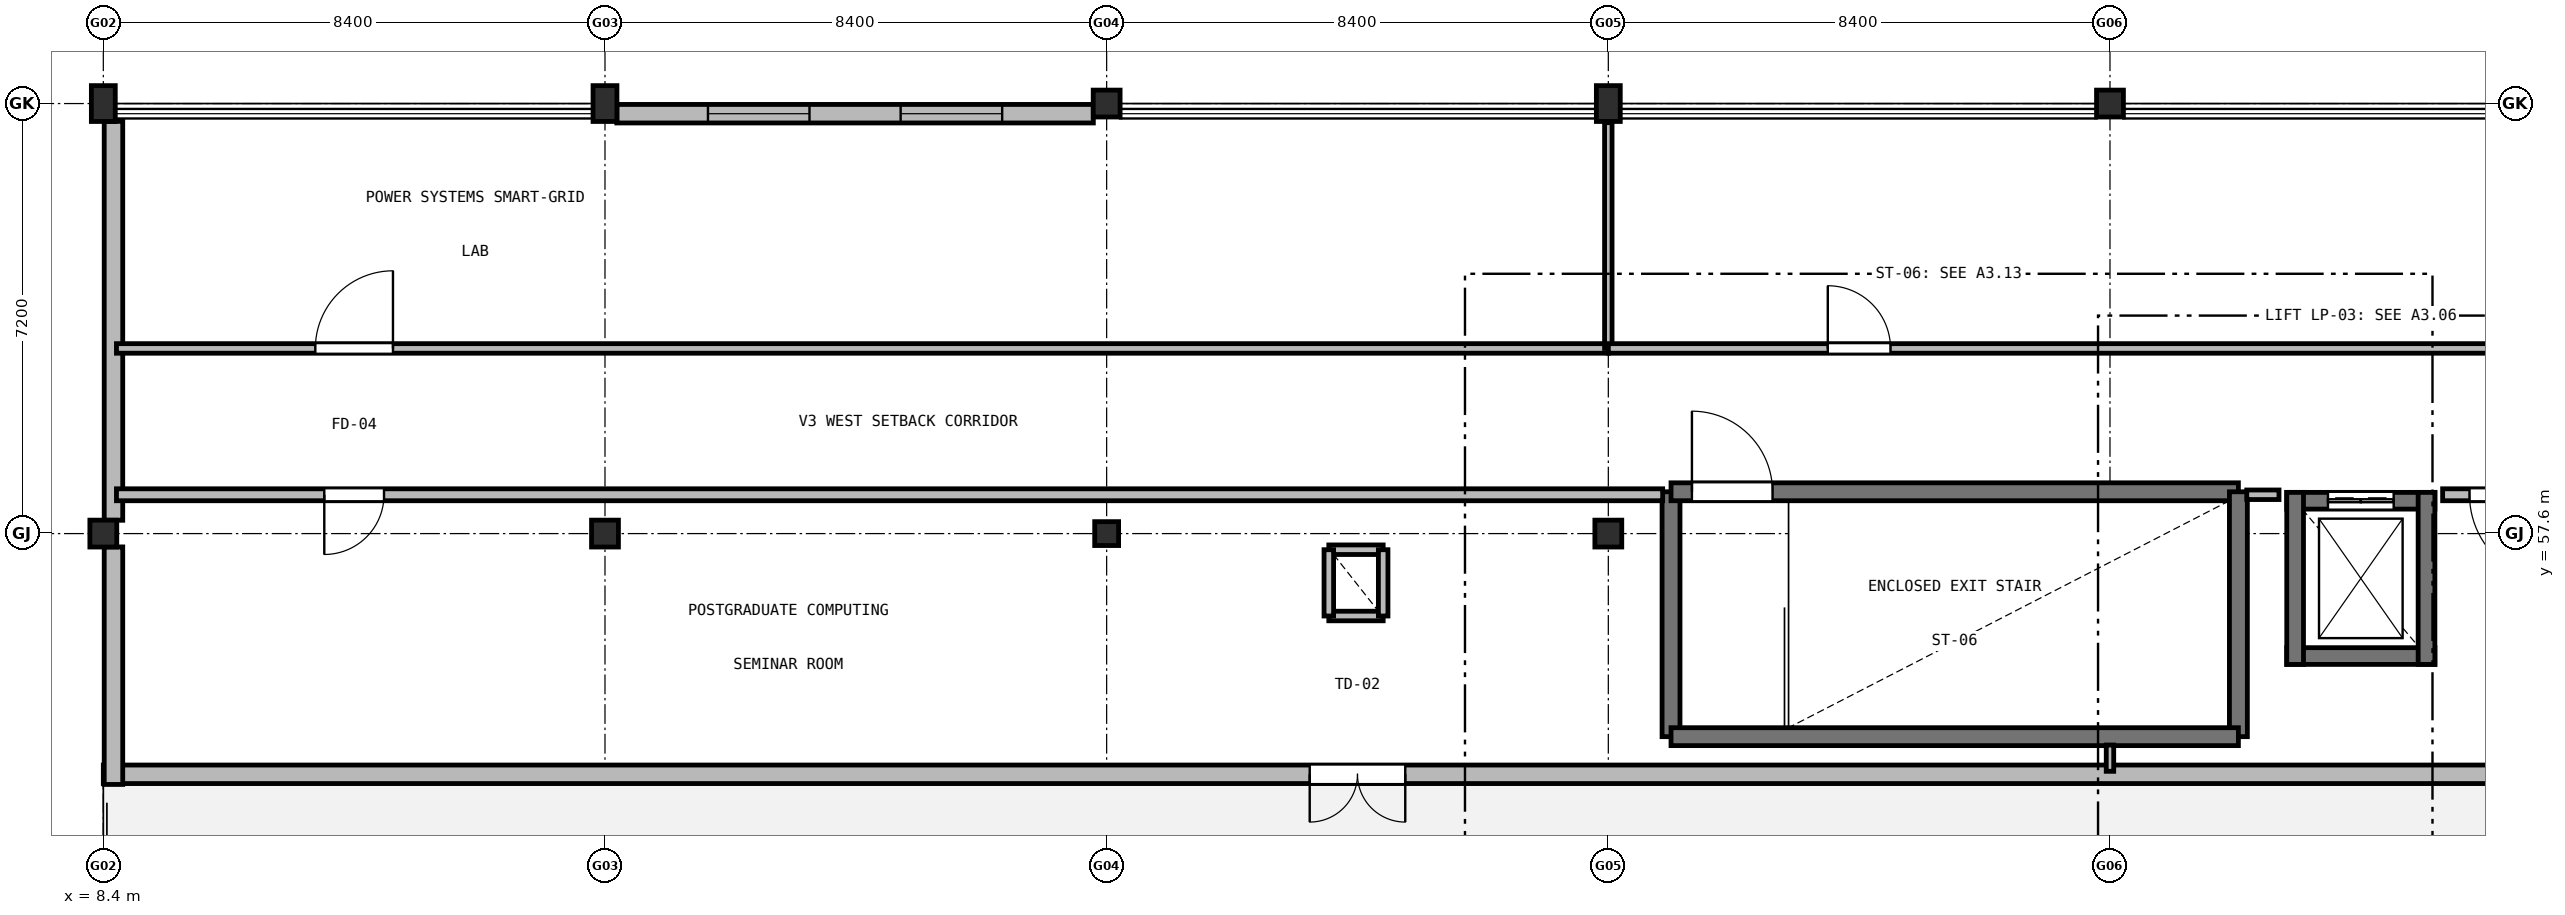
"""IFC4 building model, lengths in metres.
Left out: names, types, materials, properties, quantities, classifications, styles, units other than length and angle.
Written with IfcOpenShell. Run it as: python <this file> out.ifc"""

import sys

from ifc_helpers import new_model, si_unit, direction, frame, frame_2d, origin, origin_2d, place, context, subcontext, project, spatial, rectangle, extrude, element, fill, save


model = new_model("IFC4")
c1 = context("Model", 3, precision=1e-05, world=origin(), true_north=direction((0.0, 1.0)))
c2 = subcontext(c1, "Body", "Model", "MODEL_VIEW")
j1 = project(units=[si_unit("LENGTHUNIT", "METRE"), si_unit("PLANEANGLEUNIT", "RADIAN")], contexts=[c1])
p1 = place(None, origin())
s1 = spatial("IfcSite", under=j1, at=p1, CompositionType="ELEMENT")
p2 = place(p1, origin())
s2 = spatial("IfcBuilding", under=s1, at=p2, CompositionType="ELEMENT")
p3 = place(p2, frame((0.0, 0.0, 13.5)))
s3 = spatial("IfcBuildingStorey", under=s2, at=p3, CompositionType="ELEMENT", Elevation=13.5)
p4 = place(p3, frame((8.4, 57.6, 0.0), z_axis=(0.0, 0.0, 1.0), x_axis=(1.0, 0.0, 0.0)))
e1 = element("IfcColumn", 1, at=p4, inside=s3, PredefinedType="COLUMN", context=c2, shape_type="SweptSolid", body=[
    extrude(rectangle(XDim=0.45, YDim=0.45, at=origin_2d()), origin(), (0.0, 0.0, 1.0), 4.2),
])
p5 = place(p3, frame((8.4, 64.8, 0.0), z_axis=(0.0, 0.0, 1.0), x_axis=(1.0, 0.0, 0.0)))
e2 = element("IfcColumn", 2, at=p5, inside=s3, PredefinedType="COLUMN", context=c2, shape_type="SweptSolid", body=[
    extrude(rectangle(XDim=0.4, YDim=0.6, at=origin_2d()), origin(), (0.0, 0.0, 1.0), 4.2),
])
p6 = place(p3, frame((16.8, 57.6, 0.0), z_axis=(0.0, 0.0, 1.0), x_axis=(1.0, 0.0, 0.0)))
e3 = element("IfcColumn", 3, at=p6, inside=s3, PredefinedType="COLUMN", context=c2, shape_type="SweptSolid", body=[
    extrude(rectangle(XDim=0.45, YDim=0.45, at=origin_2d()), origin(), (0.0, 0.0, 1.0), 4.2),
])
p7 = place(p3, frame((16.8, 64.8, 0.0), z_axis=(0.0, 0.0, 1.0), x_axis=(1.0, 0.0, 0.0)))
e4 = element("IfcColumn", 4, at=p7, inside=s3, PredefinedType="COLUMN", context=c2, shape_type="SweptSolid", body=[
    extrude(rectangle(XDim=0.4, YDim=0.6, at=origin_2d()), origin(), (0.0, 0.0, 1.0), 4.2),
])
p8 = place(p3, frame((25.2, 57.6, 0.0), z_axis=(0.0, 0.0, 1.0), x_axis=(1.0, 0.0, 0.0)))
e5 = element("IfcColumn", 5, at=p8, inside=s3, PredefinedType="COLUMN", context=c2, shape_type="SweptSolid", body=[
    extrude(rectangle(XDim=0.4, YDim=0.4, at=origin_2d()), origin(), (0.0, 0.0, 1.0), 4.2),
])
for number, where, z_axis, x_axis in (
    (6, (25.2, 64.8, 0.0), (0.0, 0.0, 1.0), (1.0, 0.0, 0.0)),
    (7, (33.6, 57.6, 0.0), (0.0, 0.0, 1.0), (1.0, 0.0, 0.0)),
):
    element("IfcColumn", number, at=place(p3, frame(where, z_axis=z_axis, x_axis=x_axis)), inside=s3, PredefinedType="COLUMN", context=c2, shape_type="SweptSolid", body=[
        extrude(rectangle(XDim=0.45, YDim=0.45, at=origin_2d()), origin(), (0.0, 0.0, 1.0), 4.2),
    ])
p9 = place(p3, frame((33.6, 64.8, 0.0), z_axis=(0.0, 0.0, 1.0), x_axis=(1.0, 0.0, 0.0)))
e8 = element("IfcColumn", 8, at=p9, inside=s3, PredefinedType="COLUMN", context=c2, shape_type="SweptSolid", body=[
    extrude(rectangle(XDim=0.4, YDim=0.6, at=origin_2d()), origin(), (0.0, 0.0, 1.0), 4.2),
])
p10 = place(p3, frame((42.0, 64.8, 0.0), z_axis=(0.0, 0.0, 1.0), x_axis=(1.0, 0.0, 0.0)))
e9 = element("IfcColumn", 9, at=p10, inside=s3, PredefinedType="COLUMN", context=c2, shape_type="SweptSolid", body=[
    extrude(rectangle(XDim=0.45, YDim=0.45, at=origin_2d()), origin(), (0.0, 0.0, 1.0), 4.2),
])
p11 = place(p3, frame((16.998, 64.63, 0.0), z_axis=(0.0, 0.0, 1.0), x_axis=(1.0, 0.0, 0.0)))
e10 = element("IfcWall", 10, at=p11, inside=s3, PredefinedType="SOLIDWALL", context=c2, shape_type="SweptSolid", body=[
    extrude(rectangle(XDim=7.979, YDim=0.31, at=frame_2d((3.99, 0.0))), origin(), (0.0, 0.0, 1.0), 3.16),
])
p12 = place(p11, frame((1.526, 0.0, 0.95)))
e11 = element("IfcOpeningElement", 11, at=p12, cuts=e10, PredefinedType="OPENING", context=c2, shape_type="SweptSolid", body=[
    extrude(rectangle(XDim=1.7, YDim=1.65, at=frame_2d((0.85, 0.825))), frame((0.0, 0.165, 0.0), z_axis=(0.0, -1.0, 0.0), x_axis=(1.0, 0.0, 0.0)), (0.0, 0.0, 1.0), 0.33),
])
p13 = place(p11, frame((4.753, 0.0, 0.95)))
e12 = element("IfcOpeningElement", 12, at=p13, cuts=e10, PredefinedType="OPENING", context=c2, shape_type="SweptSolid", body=[
    extrude(rectangle(XDim=1.7, YDim=1.65, at=frame_2d((0.85, 0.825))), frame((0.0, 0.165, 0.0), z_axis=(0.0, -1.0, 0.0), x_axis=(1.0, 0.0, 0.0)), (0.0, 0.0, 1.0), 0.33),
])
p14 = place(p3, frame((67.2, 53.57, 0.0), z_axis=(0.0, 0.0, 1.0), x_axis=(-1.0, 0.0, 0.0)))
e13 = element("IfcWall", 13, at=p14, inside=s3, PredefinedType="SOLIDWALL", context=c2, shape_type="SweptSolid", body=[
    extrude(rectangle(XDim=58.8, YDim=0.31, at=frame_2d((29.4, 0.0))), origin(), (0.0, 0.0, 1.0), 3.86),
])
p15 = place(p14, frame((37.0, 0.0, 0.0)))
e14 = element("IfcOpeningElement", 14, at=p15, cuts=e13, PredefinedType="OPENING", context=c2, shape_type="SweptSolid", body=[
    extrude(rectangle(XDim=1.6, YDim=2.2, at=frame_2d((0.8, 1.1))), frame((0.0, 0.165, 0.0), z_axis=(0.0, -1.0, 0.0), x_axis=(1.0, 0.0, 0.0)), (0.0, 0.0, 1.0), 0.33),
])
p16 = place(p3, frame((8.57, 53.4, 0.0), z_axis=(0.0, 0.0, 1.0), x_axis=(0.0, 1.0, 0.0)))
e15 = element("IfcWall", 15, at=p16, inside=s3, PredefinedType="SOLIDWALL", context=c2, shape_type="SweptSolid", body=[
    extrude(rectangle(XDim=3.977, YDim=0.31, at=frame_2d((1.989, 0.0))), origin(), (0.0, 0.0, 1.0), 3.86),
])
p17 = place(p3, frame((8.57, 57.823, 0.0), z_axis=(0.0, 0.0, 1.0), x_axis=(0.0, 1.0, 0.0)))
e16 = element("IfcWall", 16, at=p17, inside=s3, PredefinedType="SOLIDWALL", context=c2, shape_type="SweptSolid", body=[
    extrude(rectangle(XDim=6.679, YDim=0.31, at=frame_2d((3.339, 0.0))), origin(), (0.0, 0.0, 1.0), 3.36),
])
p18 = place(p3, frame((34.65, 54.2, 0.0), z_axis=(0.0, 0.0, 1.0), x_axis=(0.0, 1.0, 0.0)))
e17 = element("IfcWall", 17, at=p18, inside=s3, PredefinedType="SHEAR", context=c2, shape_type="SweptSolid", body=[
    extrude(rectangle(XDim=4.1, YDim=0.3, at=frame_2d((2.05, 0.0))), origin(), (0.0, 0.0, 1.0), 3.94),
])
p19 = place(p3, frame((34.65, 58.3, 0.0), z_axis=(0.0, 0.0, 1.0), x_axis=(1.0, 0.0, 0.0)))
e18 = element("IfcWall", 18, at=p19, inside=s3, PredefinedType="SHEAR", context=c2, shape_type="SweptSolid", body=[
    extrude(rectangle(XDim=9.5, YDim=0.3, at=frame_2d((4.75, 0.0))), origin(), (0.0, 0.0, 1.0), 3.94),
])
p20 = place(p19, frame((0.35, 0.0, 0.0)))
e19 = element("IfcOpeningElement", 19, at=p20, cuts=e18, PredefinedType="OPENING", context=c2, shape_type="SweptSolid", body=[
    extrude(rectangle(XDim=1.35, YDim=2.2, at=frame_2d((0.675, 1.1))), frame((0.0, 0.16, 0.0), z_axis=(0.0, -1.0, 0.0), x_axis=(1.0, 0.0, 0.0)), (0.0, 0.0, 1.0), 0.32),
])
p21 = place(p3, frame((44.15, 58.3, 0.0), z_axis=(0.0, 0.0, 1.0), x_axis=(0.0, -1.0, 0.0)))
e20 = element("IfcWall", 20, at=p21, inside=s3, PredefinedType="SHEAR", context=c2, shape_type="SweptSolid", body=[
    extrude(rectangle(XDim=4.1, YDim=0.3, at=frame_2d((2.05, 0.0))), origin(), (0.0, 0.0, 1.0), 3.94),
])
p22 = place(p3, frame((44.15, 54.2, 0.0), z_axis=(0.0, 0.0, 1.0), x_axis=(-1.0, 0.0, 0.0)))
e21 = element("IfcWall", 21, at=p22, inside=s3, PredefinedType="SHEAR", context=c2, shape_type="SweptSolid", body=[
    extrude(rectangle(XDim=9.5, YDim=0.3, at=frame_2d((4.75, 0.0))), origin(), (0.0, 0.0, 1.0), 3.94),
])
p23 = place(p3, frame((47.44, 55.55, 0.0), z_axis=(0.0, 0.0, 1.0), x_axis=(-1.0, 0.0, 0.0)))
e22 = element("IfcWall", 22, at=p23, inside=s3, PredefinedType="SHEAR", context=c2, shape_type="SweptSolid", body=[
    extrude(rectangle(XDim=2.48, YDim=0.28, at=frame_2d((1.24, 0.0))), origin(), (0.0, 0.0, 1.0), 3.94),
])
p24 = place(p3, frame((44.96, 58.15, 0.0), z_axis=(0.0, 0.0, 1.0), x_axis=(1.0, 0.0, 0.0)))
e23 = element("IfcWall", 23, at=p24, inside=s3, PredefinedType="SHEAR", context=c2, shape_type="SweptSolid", body=[
    extrude(rectangle(XDim=2.48, YDim=0.28, at=frame_2d((1.24, 0.0))), origin(), (0.0, 0.0, 1.0), 3.94),
])
p25 = place(p24, frame((0.69, 0.0, 0.0)))
e24 = element("IfcOpeningElement", 24, at=p25, cuts=e23, PredefinedType="OPENING", context=c2, shape_type="SweptSolid", body=[
    extrude(rectangle(XDim=1.1, YDim=2.15, at=frame_2d((0.55, 1.075))), frame((0.0, 0.15, 0.0), z_axis=(0.0, -1.0, 0.0), x_axis=(1.0, 0.0, 0.0)), (0.0, 0.0, 1.0), 0.3),
])
for number, where, z_axis, x_axis in (
    (25, (45.1, 55.41, 0.0), (0.0, 0.0, 1.0), (0.0, 1.0, 0.0)),
    (26, (47.3, 58.29, 0.0), (0.0, 0.0, 1.0), (0.0, -1.0, 0.0)),
):
    element("IfcWall", number, at=place(p3, frame(where, z_axis=z_axis, x_axis=x_axis)), inside=s3, PredefinedType="SHEAR", context=c2, shape_type="SweptSolid", body=[
        extrude(rectangle(XDim=2.88, YDim=0.28, at=frame_2d((1.44, 0.0))), origin(), (0.0, 0.0, 1.0), 3.94),
    ])
p26 = place(p3, frame((28.92, 56.22, 0.0), z_axis=(0.0, 0.0, 1.0), x_axis=(1.0, 0.0, 0.0)))
e27 = element("IfcWall", 27, at=p26, inside=s3, PredefinedType="PARTITIONING", context=c2, shape_type="SweptSolid", body=[
    extrude(rectangle(XDim=0.91, YDim=0.16, at=frame_2d((0.455, 0.0))), origin(), (0.0, 0.0, 1.0), 3.65),
])
p27 = place(p3, frame((29.83, 57.33, 0.0), z_axis=(0.0, 0.0, 1.0), x_axis=(-1.0, 0.0, 0.0)))
e28 = element("IfcWall", 28, at=p27, inside=s3, PredefinedType="PARTITIONING", context=c2, shape_type="SweptSolid", body=[
    extrude(rectangle(XDim=0.91, YDim=0.16, at=frame_2d((0.455, 0.0))), origin(), (0.0, 0.0, 1.0), 3.225),
])
for number, where, z_axis, x_axis in (
    (29, (28.92, 57.33, 0.0), (0.0, 0.0, 1.0), (0.0, -1.0, 0.0)),
    (30, (29.83, 56.22, 0.0), (0.0, 0.0, 1.0), (0.0, 1.0, 0.0)),
):
    element("IfcWall", number, at=place(p3, frame(where, z_axis=z_axis, x_axis=x_axis)), inside=s3, PredefinedType="PARTITIONING", context=c2, shape_type="SweptSolid", body=[
        extrude(rectangle(XDim=1.11, YDim=0.16, at=frame_2d((0.555, 0.0))), origin(), (0.0, 0.0, 1.0), 3.225),
    ])
p28 = place(p3, frame((8.62, 60.7, 0.0), z_axis=(0.0, 0.0, 1.0), x_axis=(1.0, 0.0, 0.0)))
e31 = element("IfcWall", 31, at=p28, inside=s3, PredefinedType="PARTITIONING", context=c2, shape_type="SweptSolid", body=[
    extrude(rectangle(XDim=24.98, YDim=0.16, at=frame_2d((12.49, 0.0))), origin(), (0.0, 0.0, 1.0), 3.355),
])
p29 = place(p28, frame((3.33, 0.0, 0.0)))
e32 = element("IfcOpeningElement", 32, at=p29, cuts=e31, PredefinedType="OPENING", context=c2, shape_type="SweptSolid", body=[
    extrude(rectangle(XDim=1.3, YDim=2.15, at=frame_2d((0.65, 1.075))), frame((0.0, 0.09, 0.0), z_axis=(0.0, -1.0, 0.0), x_axis=(1.0, 0.0, 0.0)), (0.0, 0.0, 1.0), 0.18),
])
p30 = place(p3, frame((33.6, 60.7, 0.0), z_axis=(0.0, 0.0, 1.0), x_axis=(0.0, 1.0, 0.0)))
e33 = element("IfcWall", 33, at=p30, inside=s3, PredefinedType="PARTITIONING", context=c2, shape_type="SweptSolid", body=[
    extrude(rectangle(XDim=3.78, YDim=0.125, at=frame_2d((1.89, 0.0))), origin(), (0.0, 0.0, 1.0), 3.155),
])
p31 = place(p3, frame((33.6, 60.7, 0.0), z_axis=(0.0, 0.0, 1.0), x_axis=(1.0, 0.0, 0.0)))
e34 = element("IfcWall", 34, at=p31, inside=s3, PredefinedType="PARTITIONING", context=c2, shape_type="SweptSolid", body=[
    extrude(rectangle(XDim=33.38, YDim=0.16, at=frame_2d((16.69, 0.0))), origin(), (0.0, 0.0, 1.0), 3.355),
])
p32 = place(p31, frame((3.675, 0.0, 0.0)))
e35 = element("IfcOpeningElement", 35, at=p32, cuts=e34, PredefinedType="OPENING", context=c2, shape_type="SweptSolid", body=[
    extrude(rectangle(XDim=1.05, YDim=2.15, at=frame_2d((0.525, 1.075))), frame((0.0, 0.09, 0.0), z_axis=(0.0, -1.0, 0.0), x_axis=(1.0, 0.0, 0.0)), (0.0, 0.0, 1.0), 0.18),
])
p33 = place(p3, frame((34.51, 58.25, 0.0), z_axis=(0.0, 0.0, 1.0), x_axis=(-1.0, 0.0, 0.0)))
e36 = element("IfcWall", 36, at=p33, inside=s3, PredefinedType="SOLIDWALL", context=c2, shape_type="SweptSolid", body=[
    extrude(rectangle(XDim=25.89, YDim=0.2, at=frame_2d((12.945, 0.0))), origin(), (0.0, 0.0, 1.0), 3.355),
])
p34 = place(p33, frame((21.41, 0.0, 0.0)))
e37 = element("IfcOpeningElement", 37, at=p34, cuts=e36, PredefinedType="OPENING", context=c2, shape_type="SweptSolid", body=[
    extrude(rectangle(XDim=1.0, YDim=2.1, at=frame_2d((0.5, 1.05))), frame((0.0, 0.11, 0.0), z_axis=(0.0, -1.0, 0.0), x_axis=(1.0, 0.0, 0.0)), (0.0, 0.0, 1.0), 0.22),
])
p35 = place(p3, frame((42.0, 53.62, 0.0), z_axis=(0.0, 0.0, 1.0), x_axis=(0.0, 1.0, 0.0)))
e38 = element("IfcWall", 38, at=p35, inside=s3, PredefinedType="PARTITIONING", context=c2, shape_type="SweptSolid", body=[
    extrude(rectangle(XDim=0.44, YDim=0.125, at=frame_2d((0.22, 0.0))), origin(), (0.0, 0.0, 1.0), 3.85),
])
p36 = place(p3, frame((66.98, 58.25, 0.0), z_axis=(0.0, 0.0, 1.0), x_axis=(-1.0, 0.0, 0.0)))
e39 = element("IfcWall", 39, at=p36, inside=s3, PredefinedType="SOLIDWALL", context=c2, shape_type="SweptSolid", body=[
    extrude(rectangle(XDim=19.41, YDim=0.2, at=frame_2d((9.705, 0.0))), origin(), (0.0, 0.0, 1.0), 3.355),
])
p37 = place(p36, frame((17.51, 0.0, 0.0)))
e40 = element("IfcOpeningElement", 40, at=p37, cuts=e39, PredefinedType="OPENING", context=c2, shape_type="SweptSolid", body=[
    extrude(rectangle(XDim=1.45, YDim=2.2, at=frame_2d((0.725, 1.1))), frame((0.0, 0.11, 0.0), z_axis=(0.0, -1.0, 0.0), x_axis=(1.0, 0.0, 0.0)), (0.0, 0.0, 1.0), 0.22),
])
p38 = place(p3, frame((44.83, 58.25, 0.0), z_axis=(0.0, 0.0, 1.0), x_axis=(-1.0, 0.0, 0.0)))
e41 = element("IfcWall", 41, at=p38, inside=s3, PredefinedType="PARTITIONING", context=c2, shape_type="SweptSolid", body=[
    extrude(rectangle(XDim=0.54, YDim=0.16, at=frame_2d((0.27, 0.0))), origin(), (0.0, 0.0, 1.0), 3.85),
])
p39 = place(p12, origin())
e42 = element("IfcWindow", 42, at=p39, inside=s3, PartitioningType="SINGLE_PANEL", PredefinedType="WINDOW", context=c2, shape_type="SweptSolid", body=[
    extrude(rectangle(XDim=1.7, YDim=1.65, at=frame_2d((0.85, 0.825))), frame((0.0, 0.03, 0.0), z_axis=(0.0, -1.0, 0.0), x_axis=(1.0, 0.0, 0.0)), (0.0, 0.0, 1.0), 0.06),
])
fill(e11, e42)
p40 = place(p13, origin())
e43 = element("IfcWindow", 43, at=p40, inside=s3, PartitioningType="SINGLE_PANEL", PredefinedType="WINDOW", context=c2, shape_type="SweptSolid", body=[
    extrude(rectangle(XDim=1.7, YDim=1.65, at=frame_2d((0.85, 0.825))), frame((0.0, 0.03, 0.0), z_axis=(0.0, -1.0, 0.0), x_axis=(1.0, 0.0, 0.0)), (0.0, 0.0, 1.0), 0.06),
])
fill(e12, e43)
p41 = place(p15, origin())
e44 = element("IfcDoor", 44, at=p41, inside=s3, OperationType="DOUBLE_DOOR_SINGLE_SWING", PredefinedType="DOOR", context=c2, shape_type="SweptSolid", body=[
    extrude(rectangle(XDim=1.6, YDim=2.2, at=frame_2d((0.8, 1.1))), frame((0.0, 0.025, 0.0), z_axis=(0.0, -1.0, 0.0), x_axis=(1.0, 0.0, 0.0)), (0.0, 0.0, 1.0), 0.05),
])
fill(e14, e44)
p42 = place(p20, origin())
e45 = element("IfcDoor", 45, at=p42, inside=s3, OperationType="SINGLE_SWING_LEFT", PredefinedType="DOOR", context=c2, shape_type="SweptSolid", body=[
    extrude(rectangle(XDim=1.35, YDim=2.2, at=frame_2d((0.675, 1.1))), frame((0.0, 0.025, 0.0), z_axis=(0.0, -1.0, 0.0), x_axis=(1.0, 0.0, 0.0)), (0.0, 0.0, 1.0), 0.05),
])
fill(e19, e45)
p43 = place(p25, origin())
e46 = element("IfcDoor", 46, at=p43, inside=s3, OperationType="DOUBLE_DOOR_SLIDING", PredefinedType="DOOR", context=c2, shape_type="SweptSolid", body=[
    extrude(rectangle(XDim=1.1, YDim=2.15, at=frame_2d((0.55, 1.075))), frame((0.0, 0.025, 0.0), z_axis=(0.0, -1.0, 0.0), x_axis=(1.0, 0.0, 0.0)), (0.0, 0.0, 1.0), 0.05),
])
fill(e24, e46)
p44 = place(p29, origin())
e47 = element("IfcDoor", 47, at=p44, inside=s3, OperationType="SINGLE_SWING_RIGHT", PredefinedType="DOOR", context=c2, shape_type="SweptSolid", body=[
    extrude(rectangle(XDim=1.3, YDim=2.15, at=frame_2d((0.65, 1.075))), frame((0.0, 0.025, 0.0), z_axis=(0.0, -1.0, 0.0), x_axis=(1.0, 0.0, 0.0)), (0.0, 0.0, 1.0), 0.05),
])
fill(e32, e47)
p45 = place(p32, origin())
e48 = element("IfcDoor", 48, at=p45, inside=s3, OperationType="SINGLE_SWING_LEFT", PredefinedType="DOOR", context=c2, shape_type="SweptSolid", body=[
    extrude(rectangle(XDim=1.05, YDim=2.15, at=frame_2d((0.525, 1.075))), frame((0.0, 0.025, 0.0), z_axis=(0.0, -1.0, 0.0), x_axis=(1.0, 0.0, 0.0)), (0.0, 0.0, 1.0), 0.05),
])
fill(e35, e48)
p46 = place(p34, origin())
e49 = element("IfcDoor", 49, at=p46, inside=s3, OperationType="SINGLE_SWING_RIGHT", PredefinedType="DOOR", context=c2, shape_type="SweptSolid", body=[
    extrude(rectangle(XDim=1.0, YDim=2.1, at=frame_2d((0.5, 1.05))), frame((0.0, 0.025, 0.0), z_axis=(0.0, -1.0, 0.0), x_axis=(1.0, 0.0, 0.0)), (0.0, 0.0, 1.0), 0.05),
])
fill(e37, e49)
p47 = place(p37, origin())
e50 = element("IfcDoor", 50, at=p47, inside=s3, OperationType="SINGLE_SWING_LEFT", PredefinedType="DOOR", context=c2, shape_type="SweptSolid", body=[
    extrude(rectangle(XDim=1.45, YDim=2.2, at=frame_2d((0.725, 1.1))), frame((0.0, 0.025, 0.0), z_axis=(0.0, -1.0, 0.0), x_axis=(1.0, 0.0, 0.0)), (0.0, 0.0, 1.0), 0.05),
])
fill(e40, e50)
save(model, sys.argv[1])
